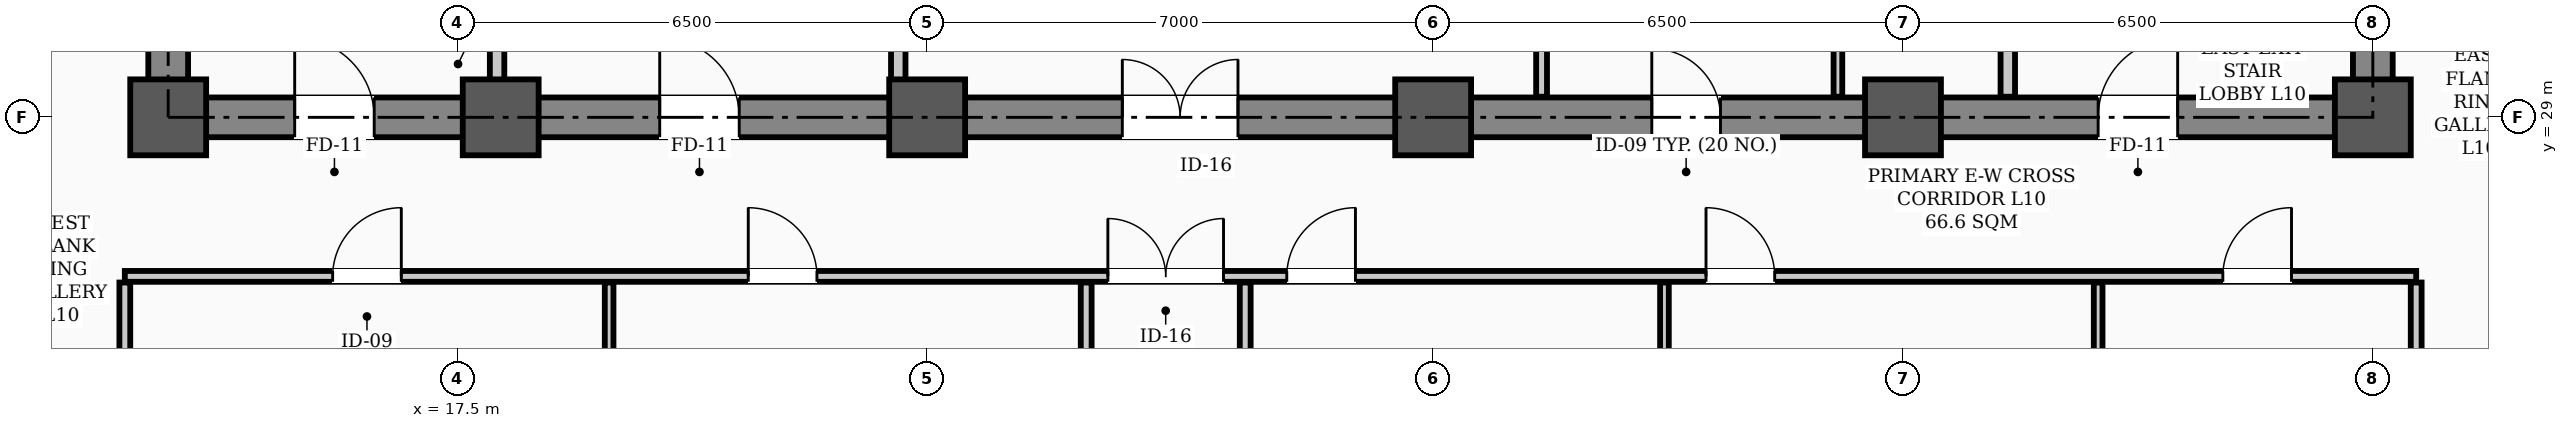
"""IFC4 building model, lengths in metres.
Left out: names, types, materials, properties, quantities, classifications, styles, units other than length and angle.
Written with IfcOpenShell. Run it as: python <this file> out.ifc"""

import sys

from ifc_helpers import new_model, si_unit, direction, frame, frame_2d, origin, origin_2d, place, context, subcontext, project, spatial, rectangle, hollow_rectangle, extrude, element, fill, save


model = new_model("IFC4")
c1 = context("Model", 3, precision=1e-05, world=origin(), true_north=direction((0.0, 1.0)))
c2 = subcontext(c1, "Body", "Model", "MODEL_VIEW")
j1 = project(units=[si_unit("LENGTHUNIT", "METRE"), si_unit("PLANEANGLEUNIT", "RADIAN")], contexts=[c1])
p1 = place(None, origin())
s1 = spatial("IfcSite", under=j1, at=p1, CompositionType="ELEMENT")
p2 = place(p1, origin())
s2 = spatial("IfcBuilding", under=s1, at=p2, CompositionType="ELEMENT")
p3 = place(p2, frame((0.0, 0.0, 42.1)))
s3 = spatial("IfcBuildingStorey", under=s2, at=p3, CompositionType="ELEMENT", Elevation=42.1)
for number, where, z_axis, x_axis in (
    (1, (13.5, 29.0, 0.0), (0.0, 0.0, 1.0), (1.0, 0.0, 0.0)),
    (2, (18.1, 29.0, 0.0), (0.0, 0.0, 1.0), (1.0, 0.0, 0.0)),
    (3, (24.0, 29.0, 0.0), (0.0, 0.0, 1.0), (1.0, 0.0, 0.0)),
    (4, (31.0, 29.0, 0.0), (0.0, 0.0, 1.0), (1.0, 0.0, 0.0)),
    (5, (37.5, 29.0, 0.0), (0.0, 0.0, 1.0), (1.0, 0.0, 0.0)),
    (6, (44.0, 29.0, 0.0), (0.0, 0.0, 1.0), (1.0, 0.0, 0.0)),
):
    element("IfcColumn", number, at=place(p3, frame(where, z_axis=z_axis, x_axis=x_axis)), inside=s3, PredefinedType="COLUMN", context=c2, shape_type="SweptSolid", body=[
        extrude(hollow_rectangle(XDim=1.05, YDim=1.05, WallThickness=0.038, InnerFilletRadius=0.019, OuterFilletRadius=0.057, at=origin_2d()), origin(), (0.0, 0.0, 1.0), 3.9),
    ])
p4 = place(p3, frame((13.5, 29.0, 0.0), z_axis=(0.0, 0.0, 1.0), x_axis=(1.0, 0.0, 0.0)))
e7 = element("IfcWall", 7, at=p4, inside=s3, PredefinedType="SHEAR", context=c2, shape_type="SweptSolid", body=[
    extrude(rectangle(XDim=30.5, YDim=0.55, at=frame_2d((15.25, 0.0))), origin(), (0.0, 0.0, 1.0), 3.72),
])
p5 = place(p4, frame((1.75, 0.0, 0.0)))
e8 = element("IfcOpeningElement", 8, at=p5, cuts=e7, PredefinedType="OPENING", context=c2, shape_type="SweptSolid", body=[
    extrude(rectangle(XDim=1.1, YDim=2.08, at=frame_2d((0.55, 1.04))), frame((0.0, 0.285, 0.0), z_axis=(0.0, -1.0, 0.0), x_axis=(1.0, 0.0, 0.0)), (0.0, 0.0, 1.0), 0.57),
])
p6 = place(p4, frame((26.7, 0.0, 0.0)))
e9 = element("IfcOpeningElement", 9, at=p6, cuts=e7, PredefinedType="OPENING", context=c2, shape_type="SweptSolid", body=[
    extrude(rectangle(XDim=1.1, YDim=2.08, at=frame_2d((0.55, 1.04))), frame((0.0, 0.285, 0.0), z_axis=(0.0, -1.0, 0.0), x_axis=(1.0, 0.0, 0.0)), (0.0, 0.0, 1.0), 0.57),
])
p7 = place(p4, frame((6.8, 0.0, 0.0)))
e10 = element("IfcOpeningElement", 10, at=p7, cuts=e7, PredefinedType="OPENING", context=c2, shape_type="SweptSolid", body=[
    extrude(rectangle(XDim=1.1, YDim=2.08, at=frame_2d((0.55, 1.04))), frame((0.0, 0.285, 0.0), z_axis=(0.0, -1.0, 0.0), x_axis=(1.0, 0.0, 0.0)), (0.0, 0.0, 1.0), 0.57),
])
p8 = place(p4, frame((13.2, 0.0, 0.0)))
e11 = element("IfcOpeningElement", 11, at=p8, cuts=e7, PredefinedType="OPENING", context=c2, shape_type="SweptSolid", body=[
    extrude(rectangle(XDim=1.6, YDim=2.08, at=frame_2d((0.8, 1.04))), frame((0.0, 0.285, 0.0), z_axis=(0.0, -1.0, 0.0), x_axis=(1.0, 0.0, 0.0)), (0.0, 0.0, 1.0), 0.57),
])
p9 = place(p4, frame((20.525, 0.0, 0.0)))
e12 = element("IfcOpeningElement", 12, at=p9, cuts=e7, PredefinedType="OPENING", context=c2, shape_type="SweptSolid", body=[
    extrude(rectangle(XDim=0.95, YDim=2.08, at=frame_2d((0.475, 1.04))), frame((0.0, 0.285, 0.0), z_axis=(0.0, -1.0, 0.0), x_axis=(1.0, 0.0, 0.0)), (0.0, 0.0, 1.0), 0.57),
])
for number, where, z_axis, x_axis in (
    (13, (13.5, 29.35, 0.0), (0.0, 0.0, 1.0), (0.0, 1.0, 0.0)),
    (14, (44.0, 29.35, 0.0), (0.0, 0.0, 1.0), (0.0, 1.0, 0.0)),
):
    element("IfcWall", number, at=place(p3, frame(where, z_axis=z_axis, x_axis=x_axis)), inside=s3, PredefinedType="SHEAR", context=c2, shape_type="SweptSolid", body=[
        extrude(rectangle(XDim=8.6, YDim=0.55, at=frame_2d((4.3, 0.0))), origin(), (0.0, 0.0, 1.0), 3.72),
    ])
p10 = place(p3, frame((12.9, 26.8, 0.0), z_axis=(0.0, 0.0, 1.0), x_axis=(1.0, 0.0, 0.0)))
e15 = element("IfcWall", 15, at=p10, inside=s3, PredefinedType="PARTITIONING", context=c2, shape_type="SweptSolid", body=[
    extrude(rectangle(XDim=31.7, YDim=0.15, at=frame_2d((15.85, 0.0))), origin(), (0.0, 0.0, 1.0), 3.1),
])
p11 = place(p10, frame((13.6, 0.0, 0.0)))
e16 = element("IfcOpeningElement", 16, at=p11, cuts=e15, PredefinedType="OPENING", context=c2, shape_type="SweptSolid", body=[
    extrude(rectangle(XDim=1.6, YDim=2.08, at=frame_2d((0.8, 1.04))), frame((0.0, 0.085, 0.0), z_axis=(0.0, -1.0, 0.0), x_axis=(1.0, 0.0, 0.0)), (0.0, 0.0, 1.0), 0.17),
])
p12 = place(p10, frame((2.875, 0.0, 0.0)))
e17 = element("IfcOpeningElement", 17, at=p12, cuts=e15, PredefinedType="OPENING", context=c2, shape_type="SweptSolid", body=[
    extrude(rectangle(XDim=0.95, YDim=2.08, at=frame_2d((0.475, 1.04))), frame((0.0, 0.085, 0.0), z_axis=(0.0, -1.0, 0.0), x_axis=(1.0, 0.0, 0.0)), (0.0, 0.0, 1.0), 0.17),
])
p13 = place(p10, frame((8.625, 0.0, 0.0)))
e18 = element("IfcOpeningElement", 18, at=p13, cuts=e15, PredefinedType="OPENING", context=c2, shape_type="SweptSolid", body=[
    extrude(rectangle(XDim=0.95, YDim=2.08, at=frame_2d((0.475, 1.04))), frame((0.0, 0.085, 0.0), z_axis=(0.0, -1.0, 0.0), x_axis=(1.0, 0.0, 0.0)), (0.0, 0.0, 1.0), 0.17),
])
p14 = place(p10, frame((16.075, 0.0, 0.0)))
e19 = element("IfcOpeningElement", 19, at=p14, cuts=e15, PredefinedType="OPENING", context=c2, shape_type="SweptSolid", body=[
    extrude(rectangle(XDim=0.95, YDim=2.08, at=frame_2d((0.475, 1.04))), frame((0.0, 0.085, 0.0), z_axis=(0.0, -1.0, 0.0), x_axis=(1.0, 0.0, 0.0)), (0.0, 0.0, 1.0), 0.17),
])
p15 = place(p10, frame((21.875, 0.0, 0.0)))
e20 = element("IfcOpeningElement", 20, at=p15, cuts=e15, PredefinedType="OPENING", context=c2, shape_type="SweptSolid", body=[
    extrude(rectangle(XDim=0.95, YDim=2.08, at=frame_2d((0.475, 1.04))), frame((0.0, 0.085, 0.0), z_axis=(0.0, -1.0, 0.0), x_axis=(1.0, 0.0, 0.0)), (0.0, 0.0, 1.0), 0.17),
])
p16 = place(p10, frame((29.025, 0.0, 0.0)))
e21 = element("IfcOpeningElement", 21, at=p16, cuts=e15, PredefinedType="OPENING", context=c2, shape_type="SweptSolid", body=[
    extrude(rectangle(XDim=0.95, YDim=2.08, at=frame_2d((0.475, 1.04))), frame((0.0, 0.085, 0.0), z_axis=(0.0, -1.0, 0.0), x_axis=(1.0, 0.0, 0.0)), (0.0, 0.0, 1.0), 0.17),
])
for number, where, z_axis, x_axis in (
    (22, (18.05, 29.285, 0.0), (0.0, 0.0, 1.0), (0.0, 1.0, 0.0)),
    (23, (38.95, 29.285, 0.0), (0.0, 0.0, 1.0), (0.0, 1.0, 0.0)),
):
    element("IfcWall", number, at=place(p3, frame(where, z_axis=z_axis, x_axis=x_axis)), inside=s3, PredefinedType="STANDARD", context=c2, shape_type="SweptSolid", body=[
        extrude(rectangle(XDim=1.015, YDim=0.2, at=frame_2d((0.508, 0.0))), origin(), (0.0, 0.0, 1.0), 3.3),
    ])
p17 = place(p3, frame((23.6, 29.285, 0.0), z_axis=(0.0, 0.0, 1.0), x_axis=(0.0, 1.0, 0.0)))
e24 = element("IfcWall", 24, at=p17, inside=s3, PredefinedType="STANDARD", context=c2, shape_type="SweptSolid", body=[
    extrude(rectangle(XDim=5.415, YDim=0.2, at=frame_2d((2.708, 0.0))), origin(), (0.0, 0.0, 1.0), 3.1),
])
p18 = place(p3, frame((32.5, 29.285, 0.0), z_axis=(0.0, 0.0, 1.0), x_axis=(0.0, 1.0, 0.0)))
e25 = element("IfcWall", 25, at=p18, inside=s3, PredefinedType="PARTITIONING", context=c2, shape_type="SweptSolid", body=[
    extrude(rectangle(XDim=2.48, YDim=0.15, at=frame_2d((1.24, 0.0))), origin(), (0.0, 0.0, 1.0), 3.3),
])
p19 = place(p3, frame((36.6, 29.285, 0.0), z_axis=(0.0, 0.0, 1.0), x_axis=(0.0, 1.0, 0.0)))
e26 = element("IfcWall", 26, at=p19, inside=s3, PredefinedType="PARTITIONING", context=c2, shape_type="SweptSolid", body=[
    extrude(rectangle(XDim=2.48, YDim=0.12, at=frame_2d((1.24, 0.0))), origin(), (0.0, 0.0, 1.0), 3.3),
])
for number, where, z_axis, x_axis in (
    (27, (26.2, 19.335, 0.0), (0.0, 0.0, 1.0), (0.0, 1.0, 0.0)),
    (28, (28.4, 19.335, 0.0), (0.0, 0.0, 1.0), (0.0, 1.0, 0.0)),
    (29, (12.9, 19.335, 0.0), (0.0, 0.0, 1.0), (0.0, 1.0, 0.0)),
    (30, (44.6, 19.335, 0.0), (0.0, 0.0, 1.0), (0.0, 1.0, 0.0)),
):
    element("IfcWall", number, at=place(p3, frame(where, z_axis=z_axis, x_axis=x_axis)), inside=s3, PredefinedType="PARTITIONING", context=c2, shape_type="SweptSolid", body=[
        extrude(rectangle(XDim=7.38, YDim=0.15, at=frame_2d((3.69, 0.0))), origin(), (0.0, 0.0, 1.0), 3.0),
    ])
for number, where, z_axis, x_axis in (
    (31, (19.6, 19.335, 0.0), (0.0, 0.0, 1.0), (0.0, 1.0, 0.0)),
    (32, (34.2, 19.335, 0.0), (0.0, 0.0, 1.0), (0.0, 1.0, 0.0)),
    (33, (40.2, 19.335, 0.0), (0.0, 0.0, 1.0), (0.0, 1.0, 0.0)),
):
    element("IfcWall", number, at=place(p3, frame(where, z_axis=z_axis, x_axis=x_axis)), inside=s3, PredefinedType="PARTITIONING", context=c2, shape_type="SweptSolid", body=[
        extrude(rectangle(XDim=7.38, YDim=0.12, at=frame_2d((3.69, 0.0))), origin(), (0.0, 0.0, 1.0), 3.0),
    ])
p20 = place(p5, origin())
e34 = element("IfcDoor", 34, at=p20, inside=s3, OperationType="SINGLE_SWING_LEFT", PredefinedType="DOOR", context=c2, shape_type="SweptSolid", body=[
    extrude(rectangle(XDim=1.1, YDim=2.08, at=frame_2d((0.55, 1.04))), frame((0.0, 0.025, 0.0), z_axis=(0.0, -1.0, 0.0), x_axis=(1.0, 0.0, 0.0)), (0.0, 0.0, 1.0), 0.05),
])
fill(e8, e34)
p21 = place(p6, origin())
e35 = element("IfcDoor", 35, at=p21, inside=s3, OperationType="SINGLE_SWING_RIGHT", PredefinedType="DOOR", context=c2, shape_type="SweptSolid", body=[
    extrude(rectangle(XDim=1.1, YDim=2.08, at=frame_2d((0.55, 1.04))), frame((0.0, 0.025, 0.0), z_axis=(0.0, -1.0, 0.0), x_axis=(1.0, 0.0, 0.0)), (0.0, 0.0, 1.0), 0.05),
])
fill(e9, e35)
p22 = place(p7, origin())
e36 = element("IfcDoor", 36, at=p22, inside=s3, OperationType="SINGLE_SWING_LEFT", PredefinedType="DOOR", context=c2, shape_type="SweptSolid", body=[
    extrude(rectangle(XDim=1.1, YDim=2.08, at=frame_2d((0.55, 1.04))), frame((0.0, 0.025, 0.0), z_axis=(0.0, -1.0, 0.0), x_axis=(1.0, 0.0, 0.0)), (0.0, 0.0, 1.0), 0.05),
])
fill(e10, e36)
p23 = place(p8, origin())
e37 = element("IfcDoor", 37, at=p23, inside=s3, OperationType="DOUBLE_DOOR_SINGLE_SWING", PredefinedType="DOOR", context=c2, shape_type="SweptSolid", body=[
    extrude(rectangle(XDim=1.6, YDim=2.08, at=frame_2d((0.8, 1.04))), frame((0.0, 0.025, 0.0), z_axis=(0.0, -1.0, 0.0), x_axis=(1.0, 0.0, 0.0)), (0.0, 0.0, 1.0), 0.05),
])
fill(e11, e37)
p24 = place(p9, origin())
e38 = element("IfcDoor", 38, at=p24, inside=s3, OperationType="SINGLE_SWING_LEFT", PredefinedType="DOOR", context=c2, shape_type="SweptSolid", body=[
    extrude(rectangle(XDim=0.95, YDim=2.08, at=frame_2d((0.475, 1.04))), frame((0.0, 0.025, 0.0), z_axis=(0.0, -1.0, 0.0), x_axis=(1.0, 0.0, 0.0)), (0.0, 0.0, 1.0), 0.05),
])
fill(e12, e38)
p25 = place(p11, origin())
e39 = element("IfcDoor", 39, at=p25, inside=s3, OperationType="DOUBLE_DOOR_SINGLE_SWING", PredefinedType="DOOR", context=c2, shape_type="SweptSolid", body=[
    extrude(rectangle(XDim=1.6, YDim=2.08, at=frame_2d((0.8, 1.04))), frame((0.0, 0.025, 0.0), z_axis=(0.0, -1.0, 0.0), x_axis=(1.0, 0.0, 0.0)), (0.0, 0.0, 1.0), 0.05),
])
fill(e16, e39)
p26 = place(p12, origin())
e40 = element("IfcDoor", 40, at=p26, inside=s3, OperationType="SINGLE_SWING_RIGHT", PredefinedType="DOOR", context=c2, shape_type="SweptSolid", body=[
    extrude(rectangle(XDim=0.95, YDim=2.08, at=frame_2d((0.475, 1.04))), frame((0.0, 0.025, 0.0), z_axis=(0.0, -1.0, 0.0), x_axis=(1.0, 0.0, 0.0)), (0.0, 0.0, 1.0), 0.05),
])
fill(e17, e40)
p27 = place(p13, origin())
e41 = element("IfcDoor", 41, at=p27, inside=s3, OperationType="SINGLE_SWING_LEFT", PredefinedType="DOOR", context=c2, shape_type="SweptSolid", body=[
    extrude(rectangle(XDim=0.95, YDim=2.08, at=frame_2d((0.475, 1.04))), frame((0.0, 0.025, 0.0), z_axis=(0.0, -1.0, 0.0), x_axis=(1.0, 0.0, 0.0)), (0.0, 0.0, 1.0), 0.05),
])
fill(e18, e41)
p28 = place(p14, origin())
e42 = element("IfcDoor", 42, at=p28, inside=s3, OperationType="SINGLE_SWING_RIGHT", PredefinedType="DOOR", context=c2, shape_type="SweptSolid", body=[
    extrude(rectangle(XDim=0.95, YDim=2.08, at=frame_2d((0.475, 1.04))), frame((0.0, 0.025, 0.0), z_axis=(0.0, -1.0, 0.0), x_axis=(1.0, 0.0, 0.0)), (0.0, 0.0, 1.0), 0.05),
])
fill(e19, e42)
p29 = place(p15, origin())
e43 = element("IfcDoor", 43, at=p29, inside=s3, OperationType="SINGLE_SWING_LEFT", PredefinedType="DOOR", context=c2, shape_type="SweptSolid", body=[
    extrude(rectangle(XDim=0.95, YDim=2.08, at=frame_2d((0.475, 1.04))), frame((0.0, 0.025, 0.0), z_axis=(0.0, -1.0, 0.0), x_axis=(1.0, 0.0, 0.0)), (0.0, 0.0, 1.0), 0.05),
])
fill(e20, e43)
p30 = place(p16, origin())
e44 = element("IfcDoor", 44, at=p30, inside=s3, OperationType="SINGLE_SWING_RIGHT", PredefinedType="DOOR", context=c2, shape_type="SweptSolid", body=[
    extrude(rectangle(XDim=0.95, YDim=2.08, at=frame_2d((0.475, 1.04))), frame((0.0, 0.025, 0.0), z_axis=(0.0, -1.0, 0.0), x_axis=(1.0, 0.0, 0.0)), (0.0, 0.0, 1.0), 0.05),
])
fill(e21, e44)
save(model, sys.argv[1])
